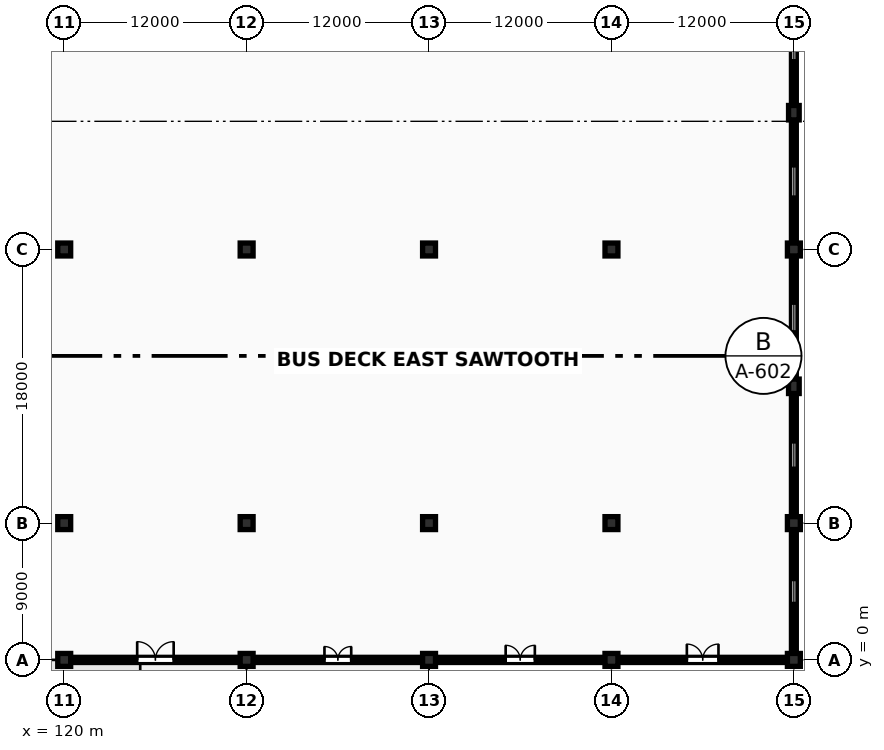
"""IFC4 building model, lengths in metres.
Left out: names, types, materials, properties, quantities, classifications, styles, units other than length and angle.
Written with IfcOpenShell. Run it as: python <this file> out.ifc"""

import sys

from ifc_helpers import new_model, si_unit, direction, frame, frame_2d, origin, origin_2d, place, context, subcontext, project, spatial, rectangle, circle, extrude, element, fill, save


model = new_model("IFC4")
c1 = context("Model", 3, precision=1e-05, world=origin(), true_north=direction((0.0, 1.0)))
c2 = subcontext(c1, "Body", "Model", "MODEL_VIEW")
j1 = project(units=[si_unit("LENGTHUNIT", "METRE"), si_unit("PLANEANGLEUNIT", "RADIAN")], contexts=[c1])
p1 = place(None, origin())
s1 = spatial("IfcSite", under=j1, at=p1, CompositionType="ELEMENT")
p2 = place(p1, origin())
s2 = spatial("IfcBuilding", under=s1, at=p2, CompositionType="ELEMENT")
p3 = place(p2, origin())
s3 = spatial("IfcBuildingStorey", under=s2, at=p3, CompositionType="ELEMENT", Elevation=0.0)
p4 = place(p3, frame((120.0, 0.0, 0.0), z_axis=(0.0, 0.0, 1.0), x_axis=(1.0, 0.0, 0.0)))
e1 = element("IfcColumn", 1, at=p4, inside=s3, PredefinedType="COLUMN", context=c2, shape_type="SweptSolid", body=[
    extrude(circle(Radius=0.425, at=origin_2d()), origin(), (0.0, 0.0, 1.0), 5.4),
])
for number, where, z_axis, x_axis in (
    (2, (120.0, 9.0, 0.0), (0.0, 0.0, 1.0), (1.0, 0.0, 0.0)),
    (3, (120.0, 27.0, 0.0), (0.0, 0.0, 1.0), (1.0, 0.0, 0.0)),
):
    element("IfcColumn", number, at=place(p3, frame(where, z_axis=z_axis, x_axis=x_axis)), inside=s3, PredefinedType="COLUMN", context=c2, shape_type="SweptSolid", body=[
        extrude(rectangle(XDim=0.85, YDim=0.85, at=origin_2d()), origin(), (0.0, 0.0, 1.0), 5.4),
    ])
p5 = place(p3, frame((132.0, 0.0, 0.0), z_axis=(0.0, 0.0, 1.0), x_axis=(1.0, 0.0, 0.0)))
e4 = element("IfcColumn", 4, at=p5, inside=s3, PredefinedType="COLUMN", context=c2, shape_type="SweptSolid", body=[
    extrude(circle(Radius=0.425, at=origin_2d()), origin(), (0.0, 0.0, 1.0), 5.4),
])
for number, where, z_axis, x_axis in (
    (5, (132.0, 9.0, 0.0), (0.0, 0.0, 1.0), (1.0, 0.0, 0.0)),
    (6, (132.0, 27.0, 0.0), (0.0, 0.0, 1.0), (1.0, 0.0, 0.0)),
):
    element("IfcColumn", number, at=place(p3, frame(where, z_axis=z_axis, x_axis=x_axis)), inside=s3, PredefinedType="COLUMN", context=c2, shape_type="SweptSolid", body=[
        extrude(rectangle(XDim=0.85, YDim=0.85, at=origin_2d()), origin(), (0.0, 0.0, 1.0), 5.4),
    ])
p6 = place(p3, frame((144.0, 0.0, 0.0), z_axis=(0.0, 0.0, 1.0), x_axis=(1.0, 0.0, 0.0)))
e7 = element("IfcColumn", 7, at=p6, inside=s3, PredefinedType="COLUMN", context=c2, shape_type="SweptSolid", body=[
    extrude(circle(Radius=0.425, at=origin_2d()), origin(), (0.0, 0.0, 1.0), 5.4),
])
for number, where, z_axis, x_axis in (
    (8, (144.0, 9.0, 0.0), (0.0, 0.0, 1.0), (1.0, 0.0, 0.0)),
    (9, (144.0, 27.0, 0.0), (0.0, 0.0, 1.0), (1.0, 0.0, 0.0)),
):
    element("IfcColumn", number, at=place(p3, frame(where, z_axis=z_axis, x_axis=x_axis)), inside=s3, PredefinedType="COLUMN", context=c2, shape_type="SweptSolid", body=[
        extrude(rectangle(XDim=0.85, YDim=0.85, at=origin_2d()), origin(), (0.0, 0.0, 1.0), 5.4),
    ])
p7 = place(p3, frame((156.0, 0.0, 0.0), z_axis=(0.0, 0.0, 1.0), x_axis=(1.0, 0.0, 0.0)))
e10 = element("IfcColumn", 10, at=p7, inside=s3, PredefinedType="COLUMN", context=c2, shape_type="SweptSolid", body=[
    extrude(circle(Radius=0.425, at=origin_2d()), origin(), (0.0, 0.0, 1.0), 5.4),
])
for number, where, z_axis, x_axis in (
    (11, (156.0, 9.0, 0.0), (0.0, 0.0, 1.0), (1.0, 0.0, 0.0)),
    (12, (156.0, 27.0, 0.0), (0.0, 0.0, 1.0), (1.0, 0.0, 0.0)),
    (13, (168.0, 0.0, 0.0), (0.0, 0.0, 1.0), (1.0, 0.0, 0.0)),
    (14, (168.0, 9.0, 0.0), (0.0, 0.0, 1.0), (1.0, 0.0, 0.0)),
    (15, (168.0, 27.0, 0.0), (0.0, 0.0, 1.0), (1.0, 0.0, 0.0)),
):
    element("IfcColumn", number, at=place(p3, frame(where, z_axis=z_axis, x_axis=x_axis)), inside=s3, PredefinedType="COLUMN", context=c2, shape_type="SweptSolid", body=[
        extrude(rectangle(XDim=0.85, YDim=0.85, at=origin_2d()), origin(), (0.0, 0.0, 1.0), 5.4),
    ])
for number, where, z_axis, x_axis in (
    (16, (168.0, 18.0, 0.0), (0.0, 0.0, 1.0), (1.0, 0.0, 0.0)),
    (17, (168.0, 36.0, 0.0), (0.0, 0.0, 1.0), (1.0, 0.0, 0.0)),
):
    element("IfcColumn", number, at=place(p3, frame(where, z_axis=z_axis, x_axis=x_axis)), inside=s3, PredefinedType="PILASTER", context=c2, shape_type="SweptSolid", body=[
        extrude(rectangle(XDim=0.7, YDim=0.95, at=origin_2d()), origin(), (0.0, 0.0, 1.0), 5.4),
    ])
p8 = place(p3, frame((120.423, 0.0, 0.0), z_axis=(0.0, 0.0, 1.0), x_axis=(1.0, 0.0, 0.0)))
e18 = element("IfcWall", 18, at=p8, inside=s3, PredefinedType="SOLIDWALL", context=c2, shape_type="SweptSolid", body=[
    extrude(rectangle(XDim=11.154, YDim=0.34, at=frame_2d((5.577, 0.0))), origin(), (0.0, 0.0, 1.0), 3.85),
])
p9 = place(p8, frame((4.377, 0.0, 0.0)))
e19 = element("IfcOpeningElement", 19, at=p9, cuts=e18, PredefinedType="OPENING", context=c2, shape_type="SweptSolid", body=[
    extrude(rectangle(XDim=2.4, YDim=2.54, at=frame_2d((1.2, 1.27))), frame((0.0, 0.185, 0.0), z_axis=(0.0, -1.0, 0.0), x_axis=(1.0, 0.0, 0.0)), (0.0, 0.0, 1.0), 0.37),
])
p10 = place(p3, frame((132.423, 0.0, 0.0), z_axis=(0.0, 0.0, 1.0), x_axis=(1.0, 0.0, 0.0)))
e20 = element("IfcWall", 20, at=p10, inside=s3, PredefinedType="SOLIDWALL", context=c2, shape_type="SweptSolid", body=[
    extrude(rectangle(XDim=11.154, YDim=0.34, at=frame_2d((5.577, 0.0))), origin(), (0.0, 0.0, 1.0), 3.85),
])
p11 = place(p10, frame((4.697, 0.0, 0.0)))
e21 = element("IfcOpeningElement", 21, at=p11, cuts=e20, PredefinedType="OPENING", context=c2, shape_type="SweptSolid", body=[
    extrude(rectangle(XDim=1.76, YDim=2.36, at=frame_2d((0.88, 1.18))), frame((0.0, 0.185, 0.0), z_axis=(0.0, -1.0, 0.0), x_axis=(1.0, 0.0, 0.0)), (0.0, 0.0, 1.0), 0.37),
])
p12 = place(p3, frame((144.423, 0.0, 0.0), z_axis=(0.0, 0.0, 1.0), x_axis=(1.0, 0.0, 0.0)))
e22 = element("IfcWall", 22, at=p12, inside=s3, PredefinedType="SOLIDWALL", context=c2, shape_type="SweptSolid", body=[
    extrude(rectangle(XDim=11.154, YDim=0.34, at=frame_2d((5.577, 0.0))), origin(), (0.0, 0.0, 1.0), 3.85),
])
p13 = place(p12, frame((4.617, 0.0, 0.0)))
e23 = element("IfcOpeningElement", 23, at=p13, cuts=e22, PredefinedType="OPENING", context=c2, shape_type="SweptSolid", body=[
    extrude(rectangle(XDim=1.92, YDim=2.4, at=frame_2d((0.96, 1.2))), frame((0.0, 0.185, 0.0), z_axis=(0.0, -1.0, 0.0), x_axis=(1.0, 0.0, 0.0)), (0.0, 0.0, 1.0), 0.37),
])
p14 = place(p3, frame((156.423, 0.0, 0.0), z_axis=(0.0, 0.0, 1.0), x_axis=(1.0, 0.0, 0.0)))
e24 = element("IfcWall", 24, at=p14, inside=s3, PredefinedType="SOLIDWALL", context=c2, shape_type="SweptSolid", body=[
    extrude(rectangle(XDim=11.154, YDim=0.34, at=frame_2d((5.577, 0.0))), origin(), (0.0, 0.0, 1.0), 3.85),
])
p15 = place(p14, frame((4.537, 0.0, 0.0)))
e25 = element("IfcOpeningElement", 25, at=p15, cuts=e24, PredefinedType="OPENING", context=c2, shape_type="SweptSolid", body=[
    extrude(rectangle(XDim=2.08, YDim=2.44, at=frame_2d((1.04, 1.22))), frame((0.0, 0.185, 0.0), z_axis=(0.0, -1.0, 0.0), x_axis=(1.0, 0.0, 0.0)), (0.0, 0.0, 1.0), 0.37),
])
p16 = place(p3, frame((168.0, 0.423, 0.0), z_axis=(0.0, 0.0, 1.0), x_axis=(0.0, 1.0, 0.0)))
e26 = element("IfcWall", 26, at=p16, inside=s3, PredefinedType="SOLIDWALL", context=c2, shape_type="SweptSolid", body=[
    extrude(rectangle(XDim=8.154, YDim=0.32, at=frame_2d((4.077, 0.0))), origin(), (0.0, 0.0, 1.0), 3.85),
])
p17 = place(p16, frame((3.317, 0.0, 0.55)))
e27 = element("IfcOpeningElement", 27, at=p17, cuts=e26, PredefinedType="OPENING", context=c2, shape_type="SweptSolid", body=[
    extrude(rectangle(XDim=1.52, YDim=1.42, at=frame_2d((0.76, 0.71))), frame((0.0, 0.175, 0.0), z_axis=(0.0, -1.0, 0.0), x_axis=(1.0, 0.0, 0.0)), (0.0, 0.0, 1.0), 0.35),
])
p18 = place(p3, frame((168.0, 9.423, 0.0), z_axis=(0.0, 0.0, 1.0), x_axis=(0.0, 1.0, 0.0)))
e28 = element("IfcWall", 28, at=p18, inside=s3, PredefinedType="SOLIDWALL", context=c2, shape_type="SweptSolid", body=[
    extrude(rectangle(XDim=8.104, YDim=0.32, at=frame_2d((4.052, 0.0))), origin(), (0.0, 0.0, 1.0), 3.85),
])
p19 = place(p18, frame((3.212, 0.0, 0.55)))
e29 = element("IfcOpeningElement", 29, at=p19, cuts=e28, PredefinedType="OPENING", context=c2, shape_type="SweptSolid", body=[
    extrude(rectangle(XDim=1.68, YDim=1.42, at=frame_2d((0.84, 0.71))), frame((0.0, 0.175, 0.0), z_axis=(0.0, -1.0, 0.0), x_axis=(1.0, 0.0, 0.0)), (0.0, 0.0, 1.0), 0.35),
])
p20 = place(p3, frame((168.0, 18.473, 0.0), z_axis=(0.0, 0.0, 1.0), x_axis=(0.0, 1.0, 0.0)))
e30 = element("IfcWall", 30, at=p20, inside=s3, PredefinedType="SOLIDWALL", context=c2, shape_type="SweptSolid", body=[
    extrude(rectangle(XDim=8.104, YDim=0.32, at=frame_2d((4.052, 0.0))), origin(), (0.0, 0.0, 1.0), 3.85),
])
p21 = place(p20, frame((3.132, 0.0, 0.55)))
e31 = element("IfcOpeningElement", 31, at=p21, cuts=e30, PredefinedType="OPENING", context=c2, shape_type="SweptSolid", body=[
    extrude(rectangle(XDim=1.84, YDim=1.42, at=frame_2d((0.92, 0.71))), frame((0.0, 0.175, 0.0), z_axis=(0.0, -1.0, 0.0), x_axis=(1.0, 0.0, 0.0)), (0.0, 0.0, 1.0), 0.35),
])
p22 = place(p3, frame((168.0, 27.423, 0.0), z_axis=(0.0, 0.0, 1.0), x_axis=(0.0, 1.0, 0.0)))
e32 = element("IfcWall", 32, at=p22, inside=s3, PredefinedType="SOLIDWALL", context=c2, shape_type="SweptSolid", body=[
    extrude(rectangle(XDim=8.104, YDim=0.32, at=frame_2d((4.052, 0.0))), origin(), (0.0, 0.0, 1.0), 3.85),
])
p23 = place(p22, frame((3.052, 0.0, 0.55)))
e33 = element("IfcOpeningElement", 33, at=p23, cuts=e32, PredefinedType="OPENING", context=c2, shape_type="SweptSolid", body=[
    extrude(rectangle(XDim=2.0, YDim=1.42, at=frame_2d((1.0, 0.71))), frame((0.0, 0.175, 0.0), z_axis=(0.0, -1.0, 0.0), x_axis=(1.0, 0.0, 0.0)), (0.0, 0.0, 1.0), 0.35),
])
p24 = place(p3, frame((168.0, 36.473, 0.0), z_axis=(0.0, 0.0, 1.0), x_axis=(0.0, 1.0, 0.0)))
e34 = element("IfcWall", 34, at=p24, inside=s3, PredefinedType="SOLIDWALL", context=c2, shape_type="SweptSolid", body=[
    extrude(rectangle(XDim=8.104, YDim=0.32, at=frame_2d((4.052, 0.0))), origin(), (0.0, 0.0, 1.0), 3.85),
])
p25 = place(p24, frame((2.972, 0.0, 0.55)))
e35 = element("IfcOpeningElement", 35, at=p25, cuts=e34, PredefinedType="OPENING", context=c2, shape_type="SweptSolid", body=[
    extrude(rectangle(XDim=2.16, YDim=1.42, at=frame_2d((1.08, 0.71))), frame((0.0, 0.175, 0.0), z_axis=(0.0, -1.0, 0.0), x_axis=(1.0, 0.0, 0.0)), (0.0, 0.0, 1.0), 0.35),
])
p26 = place(p9, frame((2.4, 0.0, 0.0), z_axis=(0.0, 0.0, 1.0), x_axis=(-1.0, 0.0, 0.0)))
e36 = element("IfcDoor", 36, at=p26, inside=s3, OperationType="DOUBLE_DOOR_SINGLE_SWING", PredefinedType="DOOR", context=c2, shape_type="SweptSolid", body=[
    extrude(rectangle(XDim=2.4, YDim=2.54, at=frame_2d((1.2, 1.27))), frame((0.0, 0.025, 0.0), z_axis=(0.0, -1.0, 0.0), x_axis=(1.0, 0.0, 0.0)), (0.0, 0.0, 1.0), 0.05),
])
fill(e19, e36)
p27 = place(p11, frame((1.76, 0.0, 0.0), z_axis=(0.0, 0.0, 1.0), x_axis=(-1.0, 0.0, 0.0)))
e37 = element("IfcDoor", 37, at=p27, inside=s3, OperationType="DOUBLE_DOOR_SINGLE_SWING", PredefinedType="DOOR", context=c2, shape_type="SweptSolid", body=[
    extrude(rectangle(XDim=1.76, YDim=2.36, at=frame_2d((0.88, 1.18))), frame((0.0, 0.025, 0.0), z_axis=(0.0, -1.0, 0.0), x_axis=(1.0, 0.0, 0.0)), (0.0, 0.0, 1.0), 0.05),
])
fill(e21, e37)
p28 = place(p13, frame((1.92, 0.0, 0.0), z_axis=(0.0, 0.0, 1.0), x_axis=(-1.0, 0.0, 0.0)))
e38 = element("IfcDoor", 38, at=p28, inside=s3, OperationType="DOUBLE_DOOR_SINGLE_SWING", PredefinedType="DOOR", context=c2, shape_type="SweptSolid", body=[
    extrude(rectangle(XDim=1.92, YDim=2.4, at=frame_2d((0.96, 1.2))), frame((0.0, 0.025, 0.0), z_axis=(0.0, -1.0, 0.0), x_axis=(1.0, 0.0, 0.0)), (0.0, 0.0, 1.0), 0.05),
])
fill(e23, e38)
p29 = place(p15, frame((2.08, 0.0, 0.0), z_axis=(0.0, 0.0, 1.0), x_axis=(-1.0, 0.0, 0.0)))
e39 = element("IfcDoor", 39, at=p29, inside=s3, OperationType="DOUBLE_DOOR_SINGLE_SWING", PredefinedType="DOOR", context=c2, shape_type="SweptSolid", body=[
    extrude(rectangle(XDim=2.08, YDim=2.44, at=frame_2d((1.04, 1.22))), frame((0.0, 0.025, 0.0), z_axis=(0.0, -1.0, 0.0), x_axis=(1.0, 0.0, 0.0)), (0.0, 0.0, 1.0), 0.05),
])
fill(e25, e39)
p30 = place(p17, origin())
e40 = element("IfcWindow", 40, at=p30, inside=s3, PartitioningType="SINGLE_PANEL", PredefinedType="WINDOW", context=c2, shape_type="SweptSolid", body=[
    extrude(rectangle(XDim=1.52, YDim=1.42, at=frame_2d((0.76, 0.71))), frame((0.0, 0.03, 0.0), z_axis=(0.0, -1.0, 0.0), x_axis=(1.0, 0.0, 0.0)), (0.0, 0.0, 1.0), 0.06),
])
fill(e27, e40)
p31 = place(p19, origin())
e41 = element("IfcWindow", 41, at=p31, inside=s3, PartitioningType="SINGLE_PANEL", PredefinedType="WINDOW", context=c2, shape_type="SweptSolid", body=[
    extrude(rectangle(XDim=1.68, YDim=1.42, at=frame_2d((0.84, 0.71))), frame((0.0, 0.03, 0.0), z_axis=(0.0, -1.0, 0.0), x_axis=(1.0, 0.0, 0.0)), (0.0, 0.0, 1.0), 0.06),
])
fill(e29, e41)
p32 = place(p21, origin())
e42 = element("IfcWindow", 42, at=p32, inside=s3, PartitioningType="DOUBLE_PANEL_VERTICAL", PredefinedType="WINDOW", context=c2, shape_type="SweptSolid", body=[
    extrude(rectangle(XDim=1.84, YDim=1.42, at=frame_2d((0.92, 0.71))), frame((0.0, 0.03, 0.0), z_axis=(0.0, -1.0, 0.0), x_axis=(1.0, 0.0, 0.0)), (0.0, 0.0, 1.0), 0.06),
])
fill(e31, e42)
p33 = place(p23, origin())
e43 = element("IfcWindow", 43, at=p33, inside=s3, PartitioningType="DOUBLE_PANEL_VERTICAL", PredefinedType="WINDOW", context=c2, shape_type="SweptSolid", body=[
    extrude(rectangle(XDim=2.0, YDim=1.42, at=frame_2d((1.0, 0.71))), frame((0.0, 0.03, 0.0), z_axis=(0.0, -1.0, 0.0), x_axis=(1.0, 0.0, 0.0)), (0.0, 0.0, 1.0), 0.06),
])
fill(e33, e43)
p34 = place(p25, origin())
e44 = element("IfcWindow", 44, at=p34, inside=s3, PartitioningType="DOUBLE_PANEL_VERTICAL", PredefinedType="WINDOW", context=c2, shape_type="SweptSolid", body=[
    extrude(rectangle(XDim=2.16, YDim=1.42, at=frame_2d((1.08, 0.71))), frame((0.0, 0.03, 0.0), z_axis=(0.0, -1.0, 0.0), x_axis=(1.0, 0.0, 0.0)), (0.0, 0.0, 1.0), 0.06),
])
fill(e35, e44)
save(model, sys.argv[1])
